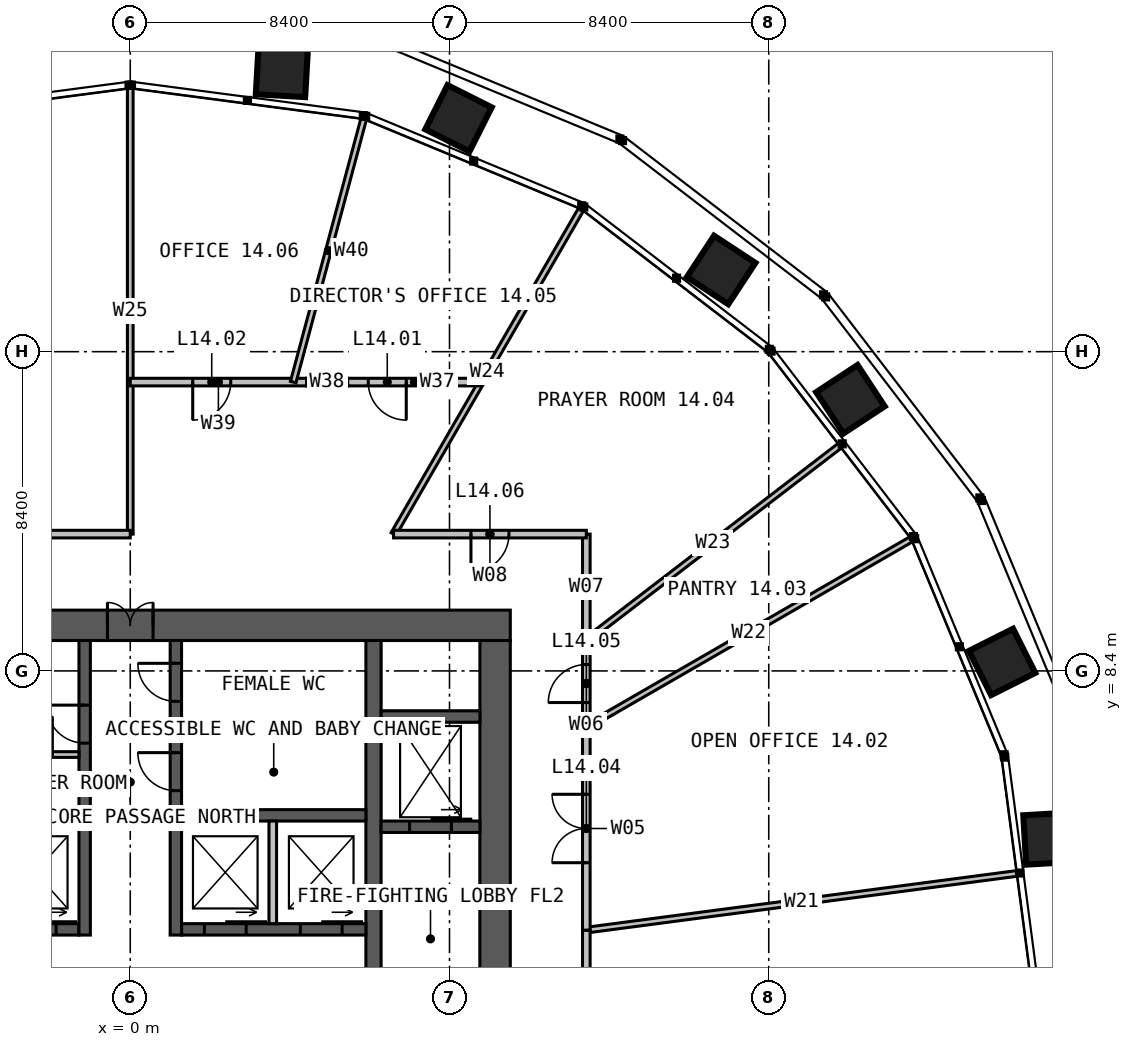
"""IFC4 building model, lengths in metres.
Left out: names, types, materials, properties, quantities, classifications, styles, units other than length and angle.
Written with IfcOpenShell. Run it as: python <this file> out.ifc"""

import sys

from ifc_helpers import new_model, si_unit, direction, frame, frame_2d, origin, place, context, subcontext, project, spatial, rectangle, extrude, element, fill, save


model = new_model("IFC4")
c1 = context("Model", 3, precision=1e-05, world=origin(), true_north=direction((0.0, 1.0)))
c2 = subcontext(c1, "Body", "Model", "MODEL_VIEW")
j1 = project(units=[si_unit("LENGTHUNIT", "METRE"), si_unit("PLANEANGLEUNIT", "RADIAN")], contexts=[c1])
p1 = place(None, origin())
s1 = spatial("IfcSite", under=j1, at=p1, CompositionType="ELEMENT")
p2 = place(p1, origin())
s2 = spatial("IfcBuilding", under=s1, at=p2, CompositionType="ELEMENT")
p3 = place(p2, frame((0.0, 0.0, 61.0)))
s3 = spatial("IfcBuildingStorey", under=s2, at=p3, CompositionType="ELEMENT", Elevation=61.0)
p4 = place(p3, frame((-10.0, 9.6, 0.0), z_axis=(0.0, 0.0, 1.0), x_axis=(1.0, 0.0, 0.0)))
e1 = element("IfcWall", 1, at=p4, inside=s3, PredefinedType="SOLIDWALL", context=c2, shape_type="SweptSolid", body=[
    extrude(rectangle(XDim=20.0, YDim=0.8, at=frame_2d((10.0, 0.0))), origin(), (0.0, 0.0, 1.0), 4.0),
])
p5 = place(p4, frame((9.4, 0.0, 0.0)))
e2 = element("IfcOpeningElement", 2, at=p5, cuts=e1, PredefinedType="OPENING", context=c2, shape_type="SweptSolid", body=[
    extrude(rectangle(XDim=1.2, YDim=2.2, at=frame_2d((0.6, 1.1))), frame((0.0, 0.41, 0.0), z_axis=(0.0, -1.0, 0.0), x_axis=(1.0, 0.0, 0.0)), (0.0, 0.0, 1.0), 0.82),
])
p6 = place(p3, frame((9.6, -9.2, 0.0), z_axis=(0.0, 0.0, 1.0), x_axis=(0.0, 1.0, 0.0)))
e3 = element("IfcWall", 3, at=p6, inside=s3, PredefinedType="SOLIDWALL", context=c2, shape_type="SweptSolid", body=[
    extrude(rectangle(XDim=18.4, YDim=0.8, at=frame_2d((9.2, 0.0))), origin(), (0.0, 0.0, 1.0), 4.0),
])
p7 = place(p3, frame((6.4, 9.2, 0.0), z_axis=(0.0, 0.0, 1.0), x_axis=(0.0, -1.0, 0.0)))
e4 = element("IfcWall", 4, at=p7, inside=s3, PredefinedType="SOLIDWALL", context=c2, shape_type="SweptSolid", body=[
    extrude(rectangle(XDim=18.4, YDim=0.4, at=frame_2d((9.2, 0.0))), origin(), (0.0, 0.0, 1.0), 4.0),
])
p8 = place(p7, frame((8.7, 0.0, 0.0)))
e5 = element("IfcOpeningElement", 5, at=p8, cuts=e4, PredefinedType="OPENING", context=c2, shape_type="SweptSolid", body=[
    extrude(rectangle(XDim=1.0, YDim=2.2, at=frame_2d((0.5, 1.1))), frame((0.0, 0.21, 0.0), z_axis=(0.0, -1.0, 0.0), x_axis=(1.0, 0.0, 0.0)), (0.0, 0.0, 1.0), 0.42),
])
p9 = place(p3, frame((-6.2, 1.6, 0.0), z_axis=(0.0, 0.0, 1.0), x_axis=(1.0, 0.0, 0.0)))
e6 = element("IfcWall", 6, at=p9, inside=s3, PredefinedType="SOLIDWALL", context=c2, shape_type="SweptSolid", body=[
    extrude(rectangle(XDim=4.85, YDim=0.3, at=frame_2d((2.425, 0.0))), origin(), (0.0, 0.0, 1.0), 4.0),
])
p10 = place(p9, frame((0.625, 0.0, 0.0)))
e7 = element("IfcOpeningElement", 7, at=p10, cuts=e6, PredefinedType="OPENING", context=c2, shape_type="SweptSolid", body=[
    extrude(rectangle(XDim=1.1, YDim=2.2, at=frame_2d((0.55, 1.1))), frame((0.0, 0.16, 0.0), z_axis=(0.0, -1.0, 0.0), x_axis=(1.0, 0.0, 0.0)), (0.0, 0.0, 1.0), 0.32),
])
p11 = place(p9, frame((3.15, 0.0, 0.0)))
e8 = element("IfcOpeningElement", 8, at=p11, cuts=e6, PredefinedType="OPENING", context=c2, shape_type="SweptSolid", body=[
    extrude(rectangle(XDim=1.1, YDim=2.2, at=frame_2d((0.55, 1.1))), frame((0.0, 0.16, 0.0), z_axis=(0.0, -1.0, 0.0), x_axis=(1.0, 0.0, 0.0)), (0.0, 0.0, 1.0), 0.32),
])
p12 = place(p3, frame((1.35, 1.6, 0.0), z_axis=(0.0, 0.0, 1.0), x_axis=(1.0, 0.0, 0.0)))
e9 = element("IfcWall", 9, at=p12, inside=s3, PredefinedType="SOLIDWALL", context=c2, shape_type="SweptSolid", body=[
    extrude(rectangle(XDim=4.85, YDim=0.3, at=frame_2d((2.425, 0.0))), origin(), (0.0, 0.0, 1.0), 4.0),
])
p13 = place(p12, frame((0.6, 0.0, 0.0)))
e10 = element("IfcOpeningElement", 10, at=p13, cuts=e9, PredefinedType="OPENING", context=c2, shape_type="SweptSolid", body=[
    extrude(rectangle(XDim=1.1, YDim=2.2, at=frame_2d((0.55, 1.1))), frame((0.0, 0.16, 0.0), z_axis=(0.0, -1.0, 0.0), x_axis=(1.0, 0.0, 0.0)), (0.0, 0.0, 1.0), 0.32),
])
p14 = place(p12, frame((3.125, 0.0, 0.0)))
e11 = element("IfcOpeningElement", 11, at=p14, cuts=e9, PredefinedType="OPENING", context=c2, shape_type="SweptSolid", body=[
    extrude(rectangle(XDim=1.1, YDim=2.2, at=frame_2d((0.55, 1.1))), frame((0.0, 0.16, 0.0), z_axis=(0.0, -1.0, 0.0), x_axis=(1.0, 0.0, 0.0)), (0.0, 0.0, 1.0), 0.32),
])
for number, where, z_axis, x_axis in (
    (12, (-6.2, 4.6, 0.0), (0.0, 0.0, 1.0), (1.0, 0.0, 0.0)),
    (13, (1.35, 4.6, 0.0), (0.0, 0.0, 1.0), (1.0, 0.0, 0.0)),
):
    element("IfcWall", number, at=place(p3, frame(where, z_axis=z_axis, x_axis=x_axis)), inside=s3, PredefinedType="SOLIDWALL", context=c2, shape_type="SweptSolid", body=[
        extrude(rectangle(XDim=4.85, YDim=0.3, at=frame_2d((2.425, 0.0))), origin(), (0.0, 0.0, 1.0), 4.0),
    ])
p15 = place(p3, frame((-1.2, 1.45, 0.0), z_axis=(0.0, 0.0, 1.0), x_axis=(0.0, 1.0, 0.0)))
e14 = element("IfcWall", 14, at=p15, inside=s3, PredefinedType="SOLIDWALL", context=c2, shape_type="SweptSolid", body=[
    extrude(rectangle(XDim=7.75, YDim=0.3, at=frame_2d((3.875, 0.0))), origin(), (0.0, 0.0, 1.0), 4.0),
])
p16 = place(p15, frame((5.05, 0.0, 0.0)))
e15 = element("IfcOpeningElement", 15, at=p16, cuts=e14, PredefinedType="OPENING", context=c2, shape_type="SweptSolid", body=[
    extrude(rectangle(XDim=1.0, YDim=2.2, at=frame_2d((0.5, 1.1))), frame((0.0, 0.16, 0.0), z_axis=(0.0, -1.0, 0.0), x_axis=(1.0, 0.0, 0.0)), (0.0, 0.0, 1.0), 0.32),
])
p17 = place(p3, frame((1.2, 1.45, 0.0), z_axis=(0.0, 0.0, 1.0), x_axis=(0.0, 1.0, 0.0)))
e16 = element("IfcWall", 16, at=p17, inside=s3, PredefinedType="SOLIDWALL", context=c2, shape_type="SweptSolid", body=[
    extrude(rectangle(XDim=7.75, YDim=0.3, at=frame_2d((3.875, 0.0))), origin(), (0.0, 0.0, 1.0), 4.0),
])
p18 = place(p17, frame((3.8, 0.0, 0.0)))
e17 = element("IfcOpeningElement", 17, at=p18, cuts=e16, PredefinedType="OPENING", context=c2, shape_type="SweptSolid", body=[
    extrude(rectangle(XDim=1.0, YDim=2.2, at=frame_2d((0.5, 1.1))), frame((0.0, 0.16, 0.0), z_axis=(0.0, -1.0, 0.0), x_axis=(1.0, 0.0, 0.0)), (0.0, 0.0, 1.0), 0.32),
])
p19 = place(p17, frame((6.15, 0.0, 0.0)))
e18 = element("IfcOpeningElement", 18, at=p19, cuts=e16, PredefinedType="OPENING", context=c2, shape_type="SweptSolid", body=[
    extrude(rectangle(XDim=1.0, YDim=2.2, at=frame_2d((0.5, 1.1))), frame((0.0, 0.16, 0.0), z_axis=(0.0, -1.0, 0.0), x_axis=(1.0, 0.0, 0.0)), (0.0, 0.0, 1.0), 0.32),
])
p20 = place(p3, frame((6.6, 4.3, 0.0), z_axis=(0.0, 0.0, 1.0), x_axis=(1.0, 0.0, 0.0)))
e19 = element("IfcWall", 19, at=p20, inside=s3, PredefinedType="SOLIDWALL", context=c2, shape_type="SweptSolid", body=[
    extrude(rectangle(XDim=2.6, YDim=0.3, at=frame_2d((1.3, 0.0))), origin(), (0.0, 0.0, 1.0), 4.0),
])
p21 = place(p20, frame((0.75, 0.0, 0.0)))
e20 = element("IfcOpeningElement", 20, at=p21, cuts=e19, PredefinedType="OPENING", context=c2, shape_type="SweptSolid", body=[
    extrude(rectangle(XDim=1.1, YDim=2.2, at=frame_2d((0.55, 1.1))), frame((0.0, 0.16, 0.0), z_axis=(0.0, -1.0, 0.0), x_axis=(1.0, 0.0, 0.0)), (0.0, 0.0, 1.0), 0.32),
])
p22 = place(p3, frame((6.6, 7.2, 0.0), z_axis=(0.0, 0.0, 1.0), x_axis=(1.0, 0.0, 0.0)))
e21 = element("IfcWall", 21, at=p22, inside=s3, PredefinedType="SOLIDWALL", context=c2, shape_type="SweptSolid", body=[
    extrude(rectangle(XDim=2.6, YDim=0.3, at=frame_2d((1.3, 0.0))), origin(), (0.0, 0.0, 1.0), 4.0),
])
p23 = place(p3, frame((3.75, 1.75, 0.0), z_axis=(0.0, 0.0, 1.0), x_axis=(0.0, 1.0, 0.0)))
e22 = element("IfcWall", 22, at=p23, inside=s3, PredefinedType="SOLIDWALL", context=c2, shape_type="SweptSolid", body=[
    extrude(rectangle(XDim=2.7, YDim=0.2, at=frame_2d((1.35, 0.0))), origin(), (0.0, 0.0, 1.0), 3.75),
])
p24 = place(p3, frame((1.35, 6.8, 0.0), z_axis=(0.0, 0.0, 1.0), x_axis=(1.0, 0.0, 0.0)))
e23 = element("IfcWall", 23, at=p24, inside=s3, PredefinedType="PARTITIONING", context=c2, shape_type="SweptSolid", body=[
    extrude(rectangle(XDim=4.85, YDim=0.15, at=frame_2d((2.425, 0.0))), origin(), (0.0, 0.0, 1.0), 3.75),
])
p25 = place(p3, frame((-6.2, 6.2, 0.0), z_axis=(0.0, 0.0, 1.0), x_axis=(1.0, 0.0, 0.0)))
e24 = element("IfcWall", 24, at=p25, inside=s3, PredefinedType="PARTITIONING", context=c2, shape_type="SweptSolid", body=[
    extrude(rectangle(XDim=4.85, YDim=0.15, at=frame_2d((2.425, 0.0))), origin(), (0.0, 0.0, 1.0), 3.75),
])
p26 = place(p25, frame((3.15, 0.0, 0.0)))
e25 = element("IfcOpeningElement", 25, at=p26, cuts=e24, PredefinedType="OPENING", context=c2, shape_type="SweptSolid", body=[
    extrude(rectangle(XDim=1.0, YDim=2.2, at=frame_2d((0.5, 1.1))), frame((0.0, 0.085, 0.0), z_axis=(0.0, -1.0, 0.0), x_axis=(1.0, 0.0, 0.0)), (0.0, 0.0, 1.0), 0.17),
])
p27 = place(p25, frame((0.75, 0.0, 0.0)))
e26 = element("IfcOpeningElement", 26, at=p27, cuts=e24, PredefinedType="OPENING", context=c2, shape_type="SweptSolid", body=[
    extrude(rectangle(XDim=0.9, YDim=2.2, at=frame_2d((0.45, 1.1))), frame((0.0, 0.085, 0.0), z_axis=(0.0, -1.0, 0.0), x_axis=(1.0, 0.0, 0.0)), (0.0, 0.0, 1.0), 0.17),
])
p28 = place(p3, frame((12.0, 1.58, 0.0), z_axis=(0.0, 0.0, 1.0), x_axis=(0.99144592532, 0.130518110492, 0.0)))
e27 = element("IfcWall", 27, at=p28, inside=s3, PredefinedType="PARTITIONING", context=c2, shape_type="SweptSolid", body=[
    extrude(rectangle(XDim=11.42, YDim=0.15, at=frame_2d((5.71, 0.0))), origin(), (0.0, 0.0, 1.0), 2.79),
])
p29 = place(p3, frame((12.0, 6.928, 0.0), z_axis=(0.0, 0.0, 1.0), x_axis=(0.866031940362, 0.499988678145, 0.0)))
e28 = element("IfcWall", 28, at=p29, inside=s3, PredefinedType="PARTITIONING", context=c2, shape_type="SweptSolid", body=[
    extrude(rectangle(XDim=9.87, YDim=0.15, at=frame_2d((4.935, 0.0))), origin(), (0.0, 0.0, 1.0), 2.79),
])
p30 = place(p3, frame((12.0, 9.208, 0.0), z_axis=(0.0, 0.0, 1.0), x_axis=(0.793361570688, 0.608750702797, 0.0)))
e29 = element("IfcWall", 29, at=p30, inside=s3, PredefinedType="PARTITIONING", context=c2, shape_type="SweptSolid", body=[
    extrude(rectangle(XDim=8.398, YDim=0.15, at=frame_2d((4.199, 0.0))), origin(), (0.0, 0.0, 1.0), 2.79),
])
p31 = place(p3, frame((6.928, 12.0, 0.0), z_axis=(0.0, 0.0, 1.0), x_axis=(0.499988678145, 0.866031940362, 0.0)))
e30 = element("IfcWall", 30, at=p31, inside=s3, PredefinedType="PARTITIONING", context=c2, shape_type="SweptSolid", body=[
    extrude(rectangle(XDim=9.87, YDim=0.15, at=frame_2d((4.935, 0.0))), origin(), (0.0, 0.0, 1.0), 2.79),
])
p32 = place(p3, frame((0.0, 12.0, 0.0), z_axis=(0.0, 0.0, 1.0), x_axis=(0.0, 1.0, 0.0)))
e31 = element("IfcWall", 31, at=p32, inside=s3, PredefinedType="PARTITIONING", context=c2, shape_type="SweptSolid", body=[
    extrude(rectangle(XDim=11.726, YDim=0.15, at=frame_2d((5.863, 0.0))), origin(), (0.0, 0.0, 1.0), 2.79),
])
p33 = place(p3, frame((12.0, -6.928, 0.0), z_axis=(0.0, 0.0, 1.0), x_axis=(0.0, 1.0, 0.0)))
e32 = element("IfcWall", 32, at=p33, inside=s3, PredefinedType="PARTITIONING", context=c2, shape_type="SweptSolid", body=[
    extrude(rectangle(XDim=8.508, YDim=0.2, at=frame_2d((4.254, 0.0))), origin(), (0.0, 0.0, 1.0), 3.8),
])
p34 = place(p33, frame((3.354, 0.0, 0.0)))
e33 = element("IfcOpeningElement", 33, at=p34, cuts=e32, PredefinedType="OPENING", context=c2, shape_type="SweptSolid", body=[
    extrude(rectangle(XDim=1.8, YDim=2.2, at=frame_2d((0.9, 1.1))), frame((0.0, 0.11, 0.0), z_axis=(0.0, -1.0, 0.0), x_axis=(1.0, 0.0, 0.0)), (0.0, 0.0, 1.0), 0.22),
])
p35 = place(p3, frame((12.0, 1.58, 0.0), z_axis=(0.0, 0.0, 1.0), x_axis=(0.0, 1.0, 0.0)))
e34 = element("IfcWall", 34, at=p35, inside=s3, PredefinedType="PARTITIONING", context=c2, shape_type="SweptSolid", body=[
    extrude(rectangle(XDim=5.348, YDim=0.2, at=frame_2d((2.674, 0.0))), origin(), (0.0, 0.0, 1.0), 3.8),
])
p36 = place(p35, frame((1.774, 0.0, 0.0)))
e35 = element("IfcOpeningElement", 35, at=p36, cuts=e34, PredefinedType="OPENING", context=c2, shape_type="SweptSolid", body=[
    extrude(rectangle(XDim=1.8, YDim=2.2, at=frame_2d((0.9, 1.1))), frame((0.0, 0.11, 0.0), z_axis=(0.0, -1.0, 0.0), x_axis=(1.0, 0.0, 0.0)), (0.0, 0.0, 1.0), 0.22),
])
p37 = place(p3, frame((12.0, 6.928, 0.0), z_axis=(0.0, 0.0, 1.0), x_axis=(0.0, 1.0, 0.0)))
e36 = element("IfcWall", 36, at=p37, inside=s3, PredefinedType="PARTITIONING", context=c2, shape_type="SweptSolid", body=[
    extrude(rectangle(XDim=2.28, YDim=0.2, at=frame_2d((1.14, 0.0))), origin(), (0.0, 0.0, 1.0), 3.8),
])
p38 = place(p37, frame((0.64, 0.0, 0.0)))
e37 = element("IfcOpeningElement", 37, at=p38, cuts=e36, PredefinedType="OPENING", context=c2, shape_type="SweptSolid", body=[
    extrude(rectangle(XDim=1.0, YDim=2.2, at=frame_2d((0.5, 1.1))), frame((0.0, 0.11, 0.0), z_axis=(0.0, -1.0, 0.0), x_axis=(1.0, 0.0, 0.0)), (0.0, 0.0, 1.0), 0.22),
])
p39 = place(p3, frame((12.0, 9.208, 0.0), z_axis=(0.0, 0.0, 1.0), x_axis=(0.0, 1.0, 0.0)))
e38 = element("IfcWall", 38, at=p39, inside=s3, PredefinedType="PARTITIONING", context=c2, shape_type="SweptSolid", body=[
    extrude(rectangle(XDim=2.792, YDim=0.2, at=frame_2d((1.396, 0.0))), origin(), (0.0, 0.0, 1.0), 3.8),
])
p40 = place(p3, frame((12.0, 12.0, 0.0), z_axis=(0.0, 0.0, 1.0), x_axis=(-1.0, 0.0, 0.0)))
e39 = element("IfcWall", 39, at=p40, inside=s3, PredefinedType="PARTITIONING", context=c2, shape_type="SweptSolid", body=[
    extrude(rectangle(XDim=5.072, YDim=0.2, at=frame_2d((2.536, 0.0))), origin(), (0.0, 0.0, 1.0), 3.8),
])
p41 = place(p40, frame((2.036, 0.0, 0.0)))
e40 = element("IfcOpeningElement", 40, at=p41, cuts=e39, PredefinedType="OPENING", context=c2, shape_type="SweptSolid", body=[
    extrude(rectangle(XDim=1.0, YDim=2.2, at=frame_2d((0.5, 1.1))), frame((0.0, 0.11, 0.0), z_axis=(0.0, -1.0, 0.0), x_axis=(1.0, 0.0, 0.0)), (0.0, 0.0, 1.0), 0.22),
])
p42 = place(p3, frame((9.238, 16.0, 0.0), z_axis=(0.0, 0.0, 1.0), x_axis=(-1.0, 0.0, 0.0)))
e41 = element("IfcWall", 41, at=p42, inside=s3, PredefinedType="PARTITIONING", context=c2, shape_type="SweptSolid", body=[
    extrude(rectangle(XDim=3.519, YDim=0.2, at=frame_2d((1.759, 0.0))), origin(), (0.0, 0.0, 1.0), 3.8),
])
p43 = place(p42, frame((1.975, 0.0, 0.0)))
e42 = element("IfcOpeningElement", 42, at=p43, cuts=e41, PredefinedType="OPENING", context=c2, shape_type="SweptSolid", body=[
    extrude(rectangle(XDim=1.0, YDim=2.2, at=frame_2d((0.5, 1.1))), frame((0.0, 0.11, 0.0), z_axis=(0.0, -1.0, 0.0), x_axis=(1.0, 0.0, 0.0)), (0.0, 0.0, 1.0), 0.22),
])
p44 = place(p3, frame((5.719, 16.0, 0.0), z_axis=(0.0, 0.0, 1.0), x_axis=(-1.0, 0.0, 0.0)))
e43 = element("IfcWall", 43, at=p44, inside=s3, PredefinedType="PARTITIONING", context=c2, shape_type="SweptSolid", body=[
    extrude(rectangle(XDim=1.081, YDim=0.2, at=frame_2d((0.541, 0.0))), origin(), (0.0, 0.0, 1.0), 3.4),
])
p45 = place(p3, frame((4.638, 16.0, 0.0), z_axis=(0.0, 0.0, 1.0), x_axis=(-1.0, 0.0, 0.0)))
e44 = element("IfcWall", 44, at=p45, inside=s3, PredefinedType="PARTITIONING", context=c2, shape_type="SweptSolid", body=[
    extrude(rectangle(XDim=4.638, YDim=0.2, at=frame_2d((2.319, 0.0))), origin(), (0.0, 0.0, 1.0), 3.8),
])
p46 = place(p45, frame((1.995, 0.0, 0.0)))
e45 = element("IfcOpeningElement", 45, at=p46, cuts=e44, PredefinedType="OPENING", context=c2, shape_type="SweptSolid", body=[
    extrude(rectangle(XDim=1.0, YDim=2.2, at=frame_2d((0.5, 1.1))), frame((0.0, 0.11, 0.0), z_axis=(0.0, -1.0, 0.0), x_axis=(1.0, 0.0, 0.0)), (0.0, 0.0, 1.0), 0.22),
])
p47 = place(p3, frame((4.287, 16.0, 0.0), z_axis=(0.0, 0.0, 1.0), x_axis=(0.258840025144, 0.96592020446, 0.0)))
e46 = element("IfcWall", 46, at=p47, inside=s3, PredefinedType="PARTITIONING", context=c2, shape_type="SweptSolid", body=[
    extrude(rectangle(XDim=7.162, YDim=0.15, at=frame_2d((3.581, 0.0))), origin(), (0.0, 0.0, 1.0), 2.79),
])
p48 = place(p3, frame((0.0, 12.0, 0.0), z_axis=(0.0, 0.0, 1.0), x_axis=(-1.0, 0.0, 0.0)))
e47 = element("IfcWall", 47, at=p48, inside=s3, PredefinedType="PARTITIONING", context=c2, shape_type="SweptSolid", body=[
    extrude(rectangle(XDim=6.928, YDim=0.2, at=frame_2d((3.464, 0.0))), origin(), (0.0, 0.0, 1.0), 3.8),
])
p49 = place(p48, frame((2.564, 0.0, 0.0)))
e48 = element("IfcOpeningElement", 48, at=p49, cuts=e47, PredefinedType="OPENING", context=c2, shape_type="SweptSolid", body=[
    extrude(rectangle(XDim=1.8, YDim=2.2, at=frame_2d((0.9, 1.1))), frame((0.0, 0.11, 0.0), z_axis=(0.0, -1.0, 0.0), x_axis=(1.0, 0.0, 0.0)), (0.0, 0.0, 1.0), 0.22),
])
p50 = place(p5, origin())
e49 = element("IfcDoor", 49, at=p50, inside=s3, OperationType="DOUBLE_DOOR_SINGLE_SWING", PredefinedType="DOOR", context=c2, shape_type="SweptSolid", body=[
    extrude(rectangle(XDim=1.2, YDim=2.2, at=frame_2d((0.6, 1.1))), frame((0.0, 0.025, 0.0), z_axis=(0.0, -1.0, 0.0), x_axis=(1.0, 0.0, 0.0)), (0.0, 0.0, 1.0), 0.05),
])
fill(e2, e49)
p51 = place(p16, origin())
e50 = element("IfcDoor", 50, at=p51, inside=s3, OperationType="SINGLE_SWING_RIGHT", PredefinedType="DOOR", context=c2, shape_type="SweptSolid", body=[
    extrude(rectangle(XDim=1.0, YDim=2.2, at=frame_2d((0.5, 1.1))), frame((0.0, 0.025, 0.0), z_axis=(0.0, -1.0, 0.0), x_axis=(1.0, 0.0, 0.0)), (0.0, 0.0, 1.0), 0.05),
])
fill(e15, e50)
p52 = place(p18, origin())
e51 = element("IfcDoor", 51, at=p52, inside=s3, OperationType="SINGLE_SWING_RIGHT", PredefinedType="DOOR", context=c2, shape_type="SweptSolid", body=[
    extrude(rectangle(XDim=1.0, YDim=2.2, at=frame_2d((0.5, 1.1))), frame((0.0, 0.025, 0.0), z_axis=(0.0, -1.0, 0.0), x_axis=(1.0, 0.0, 0.0)), (0.0, 0.0, 1.0), 0.05),
])
fill(e17, e51)
p53 = place(p19, origin())
e52 = element("IfcDoor", 52, at=p53, inside=s3, OperationType="SINGLE_SWING_RIGHT", PredefinedType="DOOR", context=c2, shape_type="SweptSolid", body=[
    extrude(rectangle(XDim=1.0, YDim=2.2, at=frame_2d((0.5, 1.1))), frame((0.0, 0.025, 0.0), z_axis=(0.0, -1.0, 0.0), x_axis=(1.0, 0.0, 0.0)), (0.0, 0.0, 1.0), 0.05),
])
fill(e18, e52)
p54 = place(p11, origin())
e53 = element("IfcDoor", 53, at=p54, inside=s3, OperationType="SLIDING_TO_LEFT", PredefinedType="DOOR", context=c2, shape_type="SweptSolid", body=[
    extrude(rectangle(XDim=1.1, YDim=2.2, at=frame_2d((0.55, 1.1))), frame((0.0, 0.025, 0.0), z_axis=(0.0, -1.0, 0.0), x_axis=(1.0, 0.0, 0.0)), (0.0, 0.0, 1.0), 0.05),
])
fill(e8, e53)
p55 = place(p13, origin())
e54 = element("IfcDoor", 54, at=p55, inside=s3, OperationType="SLIDING_TO_LEFT", PredefinedType="DOOR", context=c2, shape_type="SweptSolid", body=[
    extrude(rectangle(XDim=1.1, YDim=2.2, at=frame_2d((0.55, 1.1))), frame((0.0, 0.025, 0.0), z_axis=(0.0, -1.0, 0.0), x_axis=(1.0, 0.0, 0.0)), (0.0, 0.0, 1.0), 0.05),
])
fill(e10, e54)
p56 = place(p14, origin())
e55 = element("IfcDoor", 55, at=p56, inside=s3, OperationType="SLIDING_TO_LEFT", PredefinedType="DOOR", context=c2, shape_type="SweptSolid", body=[
    extrude(rectangle(XDim=1.1, YDim=2.2, at=frame_2d((0.55, 1.1))), frame((0.0, 0.025, 0.0), z_axis=(0.0, -1.0, 0.0), x_axis=(1.0, 0.0, 0.0)), (0.0, 0.0, 1.0), 0.05),
])
fill(e11, e55)
p57 = place(p21, origin())
e56 = element("IfcDoor", 56, at=p57, inside=s3, OperationType="SLIDING_TO_LEFT", PredefinedType="DOOR", context=c2, shape_type="SweptSolid", body=[
    extrude(rectangle(XDim=1.1, YDim=2.2, at=frame_2d((0.55, 1.1))), frame((0.0, 0.025, 0.0), z_axis=(0.0, -1.0, 0.0), x_axis=(1.0, 0.0, 0.0)), (0.0, 0.0, 1.0), 0.05),
])
fill(e20, e56)
p58 = place(p36, origin())
e57 = element("IfcDoor", 57, at=p58, inside=s3, OperationType="DOUBLE_DOOR_SINGLE_SWING", PredefinedType="DOOR", context=c2, shape_type="SweptSolid", body=[
    extrude(rectangle(XDim=1.8, YDim=2.2, at=frame_2d((0.9, 1.1))), frame((0.0, 0.025, 0.0), z_axis=(0.0, -1.0, 0.0), x_axis=(1.0, 0.0, 0.0)), (0.0, 0.0, 1.0), 0.05),
])
fill(e35, e57)
p59 = place(p38, origin())
e58 = element("IfcDoor", 58, at=p59, inside=s3, OperationType="SINGLE_SWING_LEFT", PredefinedType="DOOR", context=c2, shape_type="SweptSolid", body=[
    extrude(rectangle(XDim=1.0, YDim=2.2, at=frame_2d((0.5, 1.1))), frame((0.0, 0.025, 0.0), z_axis=(0.0, -1.0, 0.0), x_axis=(1.0, 0.0, 0.0)), (0.0, 0.0, 1.0), 0.05),
])
fill(e37, e58)
p60 = place(p41, origin())
e59 = element("IfcDoor", 59, at=p60, inside=s3, OperationType="SINGLE_SWING_RIGHT", PredefinedType="DOOR", context=c2, shape_type="SweptSolid", body=[
    extrude(rectangle(XDim=1.0, YDim=2.2, at=frame_2d((0.5, 1.1))), frame((0.0, 0.025, 0.0), z_axis=(0.0, -1.0, 0.0), x_axis=(1.0, 0.0, 0.0)), (0.0, 0.0, 1.0), 0.05),
])
fill(e40, e59)
p61 = place(p43, origin())
e60 = element("IfcDoor", 60, at=p61, inside=s3, OperationType="SINGLE_SWING_LEFT", PredefinedType="DOOR", context=c2, shape_type="SweptSolid", body=[
    extrude(rectangle(XDim=1.0, YDim=2.2, at=frame_2d((0.5, 1.1))), frame((0.0, 0.025, 0.0), z_axis=(0.0, -1.0, 0.0), x_axis=(1.0, 0.0, 0.0)), (0.0, 0.0, 1.0), 0.05),
])
fill(e42, e60)
p62 = place(p46, origin())
e61 = element("IfcDoor", 61, at=p62, inside=s3, OperationType="SINGLE_SWING_RIGHT", PredefinedType="DOOR", context=c2, shape_type="SweptSolid", body=[
    extrude(rectangle(XDim=1.0, YDim=2.2, at=frame_2d((0.5, 1.1))), frame((0.0, 0.025, 0.0), z_axis=(0.0, -1.0, 0.0), x_axis=(1.0, 0.0, 0.0)), (0.0, 0.0, 1.0), 0.05),
])
fill(e45, e61)
save(model, sys.argv[1])
